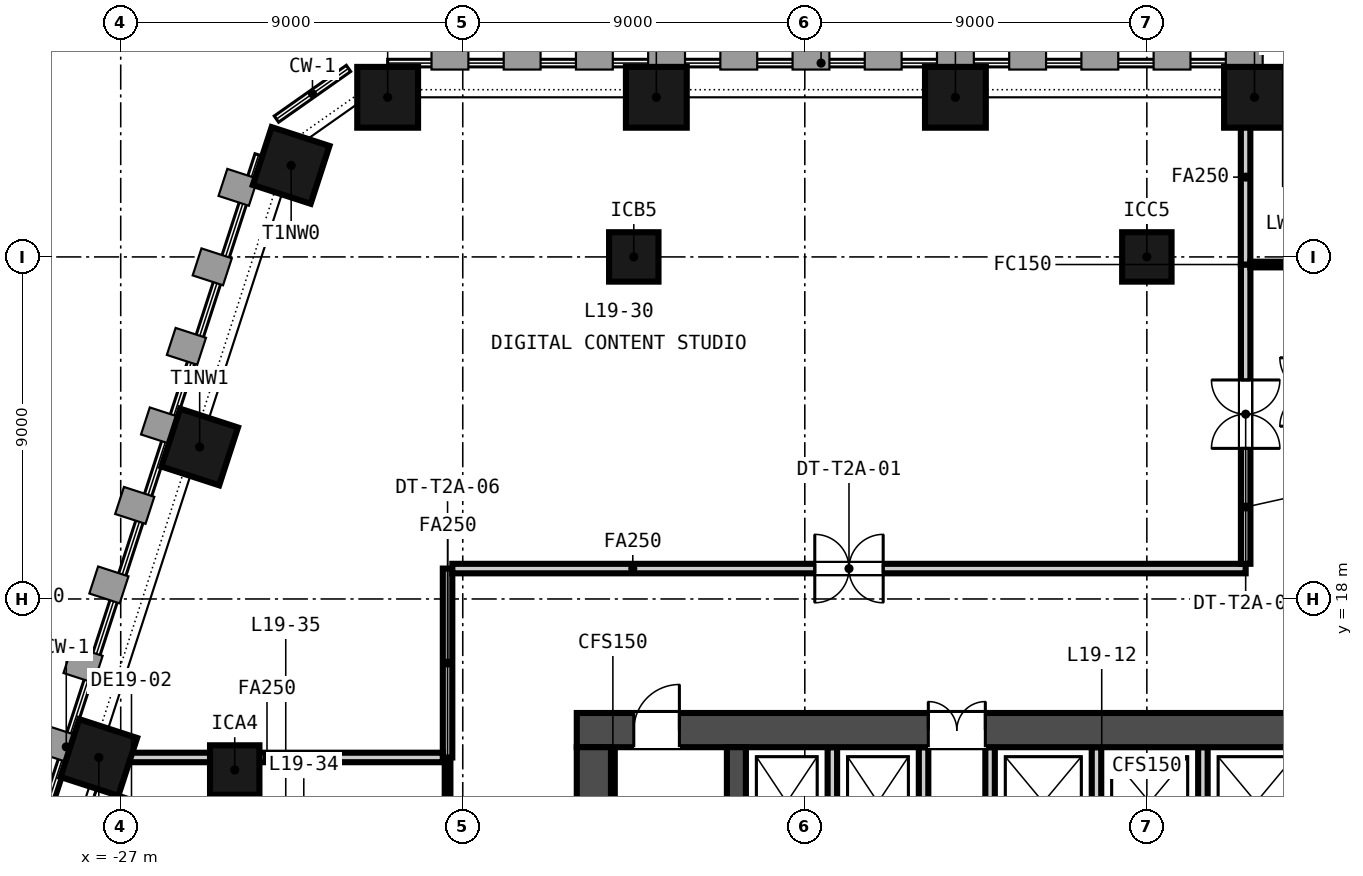
"""IFC4 building model, lengths in metres.
Left out: names, types, materials, properties, quantities, classifications, styles, units other than length and angle.
Written with IfcOpenShell. Run it as: python <this file> out.ifc"""

import sys

from ifc_helpers import new_model, si_unit, direction, frame, frame_2d, origin, origin_2d, place, context, subcontext, project, spatial, rectangle, extrude, element, fill, save


model = new_model("IFC4")
c1 = context("Model", 3, precision=1e-05, world=origin(), true_north=direction((0.0, 1.0)))
c2 = subcontext(c1, "Body", "Model", "MODEL_VIEW")
j1 = project(units=[si_unit("LENGTHUNIT", "METRE"), si_unit("PLANEANGLEUNIT", "RADIAN")], contexts=[c1])
p1 = place(None, origin())
s1 = spatial("IfcSite", under=j1, at=p1, CompositionType="ELEMENT")
p2 = place(p1, origin())
s2 = spatial("IfcBuilding", under=s1, at=p2, CompositionType="ELEMENT")
p3 = place(p2, frame((0.0, 0.0, 84.3)))
s3 = spatial("IfcBuildingStorey", under=s2, at=p3, CompositionType="ELEMENT", Elevation=84.3)
p4 = place(p3, frame((-15.0, 14.55, -0.15), z_axis=(0.0, 0.0, 1.0), x_axis=(1.0, 0.0, 0.0)))
e1 = element("IfcWall", 1, at=p4, inside=s3, PredefinedType="SOLIDWALL", context=c2, shape_type="SweptSolid", body=[
    extrude(rectangle(XDim=30.0, YDim=0.9, at=frame_2d((15.0, 0.0))), origin(), (0.0, 0.0, 1.0), 3.65),
])
p5 = place(p4, frame((9.25, 0.0, 0.15)))
e2 = element("IfcOpeningElement", 2, at=p5, cuts=e1, PredefinedType="OPENING", context=c2, shape_type="SweptSolid", body=[
    extrude(rectangle(XDim=1.5, YDim=2.1, at=frame_2d((0.75, 1.05))), frame((0.0, 0.46, 0.0), z_axis=(0.0, -1.0, 0.0), x_axis=(1.0, 0.0, 0.0)), (0.0, 0.0, 1.0), 0.92),
])
p6 = place(p4, frame((19.4, 0.0, 0.15)))
e3 = element("IfcOpeningElement", 3, at=p6, cuts=e1, PredefinedType="OPENING", context=c2, shape_type="SweptSolid", body=[
    extrude(rectangle(XDim=1.5, YDim=2.1, at=frame_2d((0.75, 1.05))), frame((0.0, 0.46, 0.0), z_axis=(0.0, -1.0, 0.0), x_axis=(1.0, 0.0, 0.0)), (0.0, 0.0, 1.0), 0.92),
])
p7 = place(p4, frame((1.5, 0.0, 0.15)))
e4 = element("IfcOpeningElement", 4, at=p7, cuts=e1, PredefinedType="OPENING", context=c2, shape_type="SweptSolid", body=[
    extrude(rectangle(XDim=1.2, YDim=2.1, at=frame_2d((0.6, 1.05))), frame((0.0, 0.46, 0.0), z_axis=(0.0, -1.0, 0.0), x_axis=(1.0, 0.0, 0.0)), (0.0, 0.0, 1.0), 0.92),
])
p8 = place(p4, frame((27.3, 0.0, 0.15)))
e5 = element("IfcOpeningElement", 5, at=p8, cuts=e1, PredefinedType="OPENING", context=c2, shape_type="SweptSolid", body=[
    extrude(rectangle(XDim=1.2, YDim=2.1, at=frame_2d((0.6, 1.05))), frame((0.0, 0.46, 0.0), z_axis=(0.0, -1.0, 0.0), x_axis=(1.0, 0.0, 0.0)), (0.0, 0.0, 1.0), 0.92),
])
p9 = place(p3, frame((-14.55, 0.9, -0.15), z_axis=(0.0, 0.0, 1.0), x_axis=(0.0, 1.0, 0.0)))
e6 = element("IfcWall", 6, at=p9, inside=s3, PredefinedType="SOLIDWALL", context=c2, shape_type="SweptSolid", body=[
    extrude(rectangle(XDim=13.2, YDim=0.9, at=frame_2d((6.6, 0.0))), origin(), (0.0, 0.0, 1.0), 3.65),
])
p10 = place(p3, frame((-10.8, 0.9, -0.15), z_axis=(0.0, 0.0, 1.0), x_axis=(0.0, 1.0, 0.0)))
e7 = element("IfcWall", 7, at=p10, inside=s3, PredefinedType="SOLIDWALL", context=c2, shape_type="SweptSolid", body=[
    extrude(rectangle(XDim=13.2, YDim=0.5, at=frame_2d((6.6, 0.0))), origin(), (0.0, 0.0, 1.0), 3.65),
])
for number, where, z_axis, x_axis in (
    (8, (2.832, 31.2, -0.15), (0.0, 0.0, 1.0), (-1.0, 0.0, 0.0)),
    (9, (-5.037, 31.2, -0.15), (0.0, 0.0, 1.0), (-1.0, 0.0, 0.0)),
    (10, (-12.907, 31.2, -0.15), (0.0, 0.0, 1.0), (-1.0, 0.0, 0.0)),
    (11, (-19.976, 31.2, -0.15), (0.0, 0.0, 1.0), (-1.0, 0.0, 0.0)),
    (12, (-22.515, 29.407, -0.15), (0.0, 0.0, 1.0), (-0.309, -0.951, 0.0)),
    (13, (-24.923, 21.999, -0.15), (0.0, 0.0, 1.0), (-0.309, -0.951, 0.0)),
    (14, (-27.577, 13.83, -0.15), (0.0, 0.0, 1.0), (-0.309, -0.951, 0.0)),
):
    element("IfcColumn", number, at=place(p3, frame(where, z_axis=z_axis, x_axis=x_axis)), inside=s3, PredefinedType="COLUMN", context=c2, shape_type="SweptSolid", body=[
        extrude(rectangle(XDim=1.6, YDim=1.6, at=origin_2d()), origin(), (0.0, 0.0, 1.0), 3.65),
    ])
for number, where, z_axis, x_axis in (
    (15, (-24.0, 13.5, -0.15), (0.0, 0.0, 1.0), (1.0, 0.0, 0.0)),
    (16, (-13.5, 27.0, -0.15), (0.0, 0.0, 1.0), (1.0, 0.0, 0.0)),
    (17, (0.0, 27.0, -0.15), (0.0, 0.0, 1.0), (1.0, 0.0, 0.0)),
):
    element("IfcColumn", number, at=place(p3, frame(where, z_axis=z_axis, x_axis=x_axis)), inside=s3, PredefinedType="COLUMN", context=c2, shape_type="SweptSolid", body=[
        extrude(rectangle(XDim=1.3, YDim=1.3, at=origin_2d()), origin(), (0.0, 0.0, 1.0), 3.65),
    ])
for number, where, z_axis, x_axis in (
    (18, (-8.275, 11.3, 0.0), (0.0, 0.0, 1.0), (0.0, 1.0, 0.0)),
    (19, (-5.875, 11.3, 0.0), (0.0, 0.0, 1.0), (0.0, 1.0, 0.0)),
    (20, (-4.125, 11.3, 0.0), (0.0, 0.0, 1.0), (0.0, 1.0, 0.0)),
    (21, (-1.325, 11.3, 0.0), (0.0, 0.0, 1.0), (0.0, 1.0, 0.0)),
    (22, (1.475, 11.3, 0.0), (0.0, 0.0, 1.0), (0.0, 1.0, 0.0)),
):
    element("IfcWall", number, at=place(p3, frame(where, z_axis=z_axis, x_axis=x_axis)), inside=s3, PredefinedType="PARTITIONING", context=c2, shape_type="SweptSolid", body=[
        extrude(rectangle(XDim=2.8, YDim=0.25, at=frame_2d((1.4, 0.0))), origin(), (0.0, 0.0, 1.0), 3.5),
    ])
p11 = place(p3, frame((-14.05, 0.9, 0.0), z_axis=(0.0, 0.0, 1.0), x_axis=(0.0, 1.0, 0.0)))
e23 = element("IfcWall", 23, at=p11, inside=s3, PredefinedType="SOLIDWALL", context=c2, shape_type="SweptSolid", body=[
    extrude(rectangle(XDim=13.2, YDim=0.1, at=frame_2d((6.6, 0.0))), origin(), (0.0, 0.0, 1.0), 3.5),
])
p12 = place(p3, frame((-18.4, 13.83, 0.0), z_axis=(0.0, 0.0, 1.0), x_axis=(0.0, 1.0, 0.0)))
e24 = element("IfcWall", 24, at=p12, inside=s3, PredefinedType="PARTITIONING", context=c2, shape_type="SweptSolid", body=[
    extrude(rectangle(XDim=4.97, YDim=0.25, at=frame_2d((2.485, 0.0))), origin(), (0.0, 0.0, 1.0), 2.741),
])
p13 = place(p3, frame((-18.275, 18.8, 0.0), z_axis=(0.0, 0.0, 1.0), x_axis=(1.0, 0.0, 0.0)))
e25 = element("IfcWall", 25, at=p13, inside=s3, PredefinedType="PARTITIONING", context=c2, shape_type="SweptSolid", body=[
    extrude(rectangle(XDim=20.875, YDim=0.25, at=frame_2d((10.438, 0.0))), origin(), (0.0, 0.0, 1.0), 2.741),
])
p14 = place(p13, frame((9.538, 0.0, 0.0)))
e26 = element("IfcOpeningElement", 26, at=p14, cuts=e25, PredefinedType="OPENING", context=c2, shape_type="SweptSolid", body=[
    extrude(rectangle(XDim=1.8, YDim=2.1, at=frame_2d((0.9, 1.05))), frame((0.0, 0.135, 0.0), z_axis=(0.0, -1.0, 0.0), x_axis=(1.0, 0.0, 0.0)), (0.0, 0.0, 1.0), 0.27),
])
p15 = place(p3, frame((2.6, 18.925, 0.0), z_axis=(0.0, 0.0, 1.0), x_axis=(0.0, 1.0, 0.0)))
e27 = element("IfcWall", 27, at=p15, inside=s3, PredefinedType="PARTITIONING", context=c2, shape_type="SweptSolid", body=[
    extrude(rectangle(XDim=7.875, YDim=0.25, at=frame_2d((3.938, 0.0))), origin(), (0.0, 0.0, 1.0), 2.741),
])
p16 = place(p15, frame((3.038, 0.0, 0.0)))
e28 = element("IfcOpeningElement", 28, at=p16, cuts=e27, PredefinedType="OPENING", context=c2, shape_type="SweptSolid", body=[
    extrude(rectangle(XDim=1.8, YDim=2.1, at=frame_2d((0.9, 1.05))), frame((0.0, 0.135, 0.0), z_axis=(0.0, -1.0, 0.0), x_axis=(1.0, 0.0, 0.0)), (0.0, 0.0, 1.0), 0.27),
])
p17 = place(p3, frame((2.598, 26.8, 0.0), z_axis=(0.0, 0.0, 1.0), x_axis=(0.0, 1.0, 0.0)))
e29 = element("IfcWall", 29, at=p17, inside=s3, PredefinedType="PARTITIONING", context=c2, shape_type="SweptSolid", body=[
    extrude(rectangle(XDim=4.6, YDim=0.25, at=frame_2d((2.3, 0.0))), origin(), (0.0, 0.0, 1.0), 2.741),
])
p18 = place(p3, frame((-27.787, 13.83, 0.0), z_axis=(0.0, 0.0, 1.0), x_axis=(1.0, 0.0, 0.0)))
e30 = element("IfcWall", 30, at=p18, inside=s3, PredefinedType="PARTITIONING", context=c2, shape_type="SweptSolid", body=[
    extrude(rectangle(XDim=9.262, YDim=0.25, at=frame_2d((4.631, 0.0))), origin(), (0.0, 0.0, 1.0), 2.741),
])
p19 = place(p3, frame((2.725, 26.8, 0.0), z_axis=(0.0, 0.0, 1.0), x_axis=(1.0, 0.0, 0.0)))
e31 = element("IfcWall", 31, at=p19, inside=s3, PredefinedType="PARTITIONING", context=c2, shape_type="SweptSolid", body=[
    extrude(rectangle(XDim=1.6, YDim=0.15, at=frame_2d((0.8, 0.0))), origin(), (0.0, 0.0, 1.0), 2.741),
])
p20 = place(p3, frame((-18.4, 9.714, 0.0), z_axis=(0.0, 0.0, 1.0), x_axis=(0.0, 1.0, 0.0)))
e32 = element("IfcWall", 32, at=p20, inside=s3, PredefinedType="PARTITIONING", context=c2, shape_type="SweptSolid", body=[
    extrude(rectangle(XDim=3.991, YDim=0.15, at=frame_2d((1.996, 0.0))), origin(), (0.0, 0.0, 1.0), 2.741),
])
p21 = place(p20, frame((1.496, 0.0, 0.0)))
e33 = element("IfcOpeningElement", 33, at=p21, cuts=e32, PredefinedType="OPENING", context=c2, shape_type="SweptSolid", body=[
    extrude(rectangle(XDim=1.0, YDim=2.1, at=frame_2d((0.5, 1.05))), frame((0.0, 0.085, 0.0), z_axis=(0.0, -1.0, 0.0), x_axis=(1.0, 0.0, 0.0)), (0.0, 0.0, 1.0), 0.17),
])
p22 = place(p5, origin())
e34 = element("IfcDoor", 34, at=p22, inside=s3, OperationType="DOUBLE_DOOR_SINGLE_SWING", PredefinedType="DOOR", context=c2, shape_type="SweptSolid", body=[
    extrude(rectangle(XDim=1.5, YDim=2.1, at=frame_2d((0.75, 1.05))), frame((0.0, 0.025, 0.0), z_axis=(0.0, -1.0, 0.0), x_axis=(1.0, 0.0, 0.0)), (0.0, 0.0, 1.0), 0.05),
])
fill(e2, e34)
p23 = place(p7, origin())
e35 = element("IfcDoor", 35, at=p23, inside=s3, OperationType="SINGLE_SWING_RIGHT", PredefinedType="DOOR", context=c2, shape_type="SweptSolid", body=[
    extrude(rectangle(XDim=1.2, YDim=2.1, at=frame_2d((0.6, 1.05))), frame((0.0, 0.025, 0.0), z_axis=(0.0, -1.0, 0.0), x_axis=(1.0, 0.0, 0.0)), (0.0, 0.0, 1.0), 0.05),
])
fill(e4, e35)
p24 = place(p14, origin())
e36 = element("IfcDoor", 36, at=p24, inside=s3, OperationType="DOUBLE_DOOR_DOUBLE_SWING", PredefinedType="DOOR", context=c2, shape_type="SweptSolid", body=[
    extrude(rectangle(XDim=1.8, YDim=2.1, at=frame_2d((0.9, 1.05))), frame((0.0, 0.025, 0.0), z_axis=(0.0, -1.0, 0.0), x_axis=(1.0, 0.0, 0.0)), (0.0, 0.0, 1.0), 0.05),
])
fill(e26, e36)
p25 = place(p16, origin())
e37 = element("IfcDoor", 37, at=p25, inside=s3, OperationType="DOUBLE_DOOR_DOUBLE_SWING", PredefinedType="DOOR", context=c2, shape_type="SweptSolid", body=[
    extrude(rectangle(XDim=1.8, YDim=2.1, at=frame_2d((0.9, 1.05))), frame((0.0, 0.025, 0.0), z_axis=(0.0, -1.0, 0.0), x_axis=(1.0, 0.0, 0.0)), (0.0, 0.0, 1.0), 0.05),
])
fill(e28, e37)
save(model, sys.argv[1])
